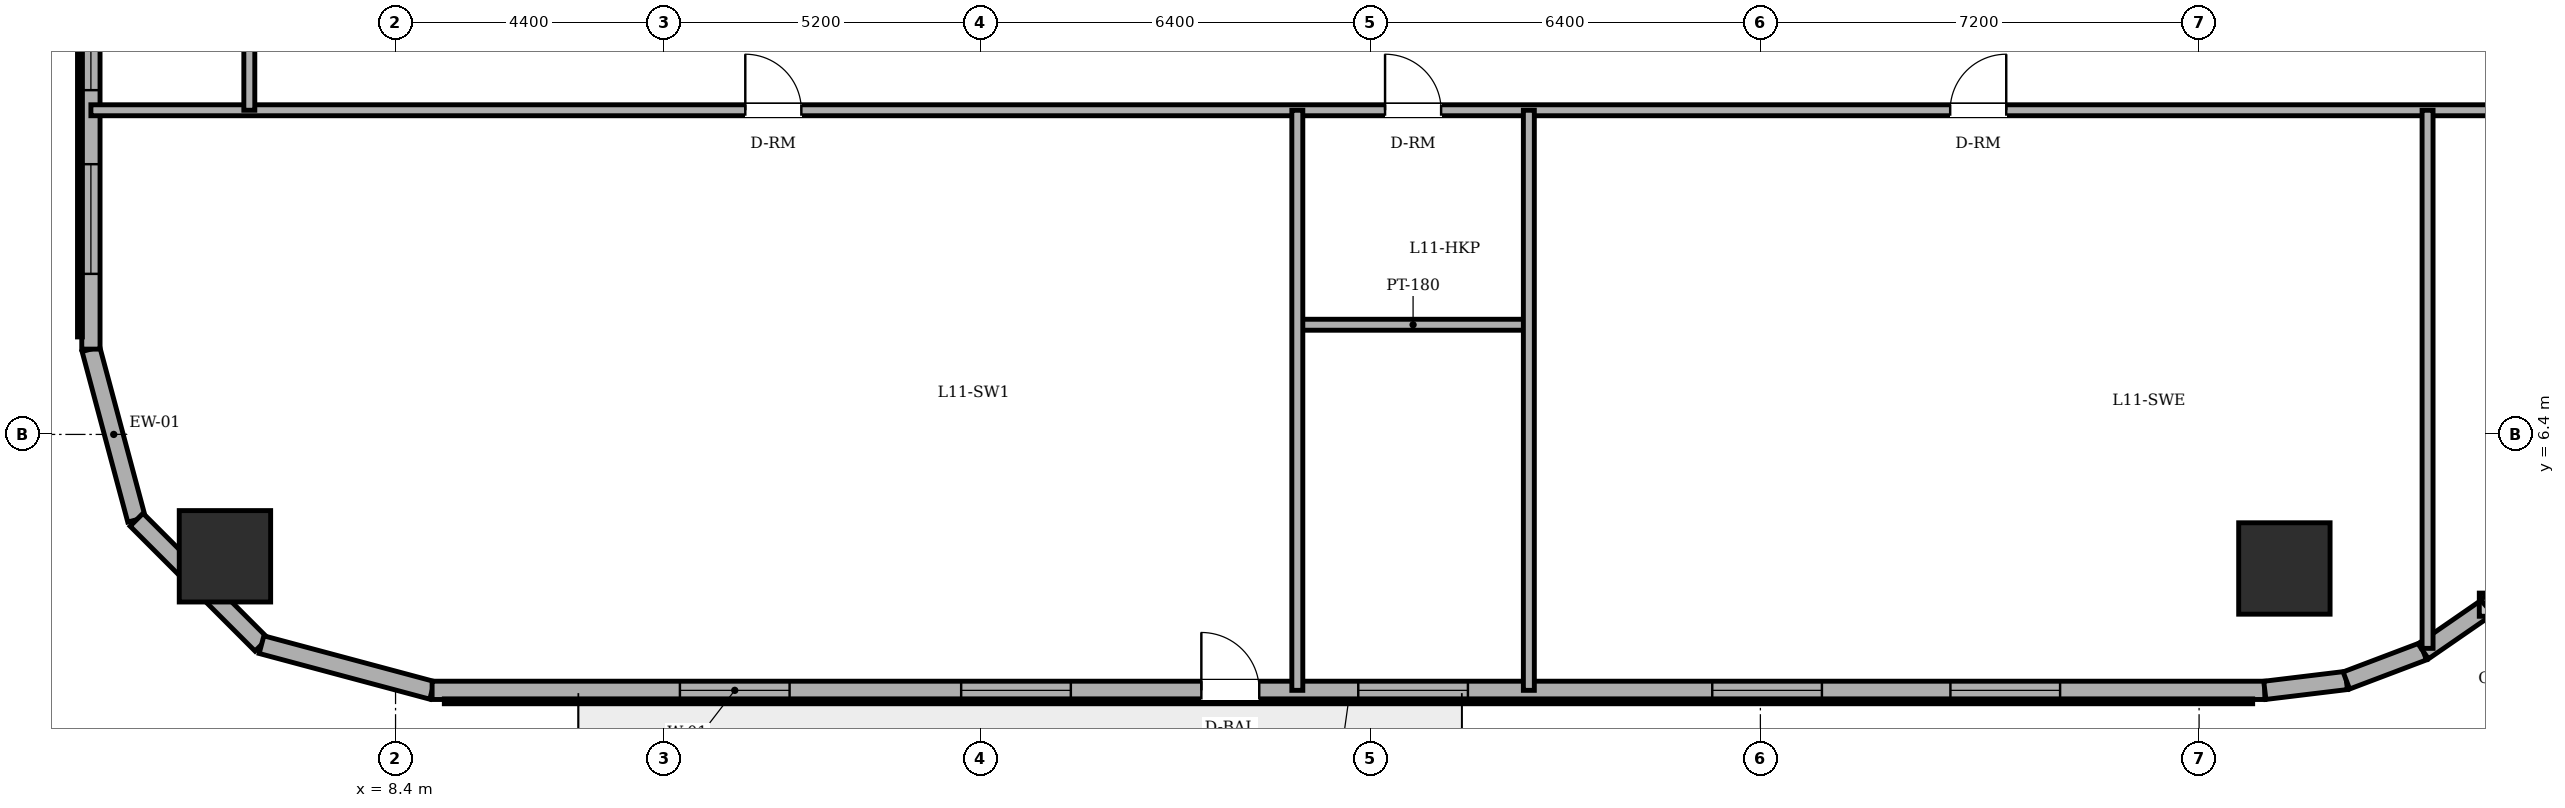
"""IFC4 building model, lengths in metres.
Left out: names, types, materials, properties, quantities, classifications, styles, units other than length and angle.
Written with IfcOpenShell. Run it as: python <this file> out.ifc"""

import sys

from ifc_helpers import new_model, si_unit, direction, frame, frame_2d, origin, origin_2d, place, context, subcontext, project, spatial, rectangle, circle, extrude, element, fill, save


model = new_model("IFC4")
c1 = context("Model", 3, precision=1e-05, world=origin(), true_north=direction((0.0, 1.0)))
c2 = subcontext(c1, "Body", "Model", "MODEL_VIEW")
j1 = project(units=[si_unit("LENGTHUNIT", "METRE"), si_unit("PLANEANGLEUNIT", "RADIAN")], contexts=[c1])
p1 = place(None, origin())
s1 = spatial("IfcSite", under=j1, at=p1, CompositionType="ELEMENT")
p2 = place(p1, origin())
s2 = spatial("IfcBuilding", under=s1, at=p2, CompositionType="ELEMENT")
p3 = place(p2, frame((0.0, 0.0, 43.2)))
s3 = spatial("IfcBuildingStorey", under=s2, at=p3, CompositionType="ELEMENT", Elevation=43.2)
for number, where, z_axis, x_axis in (
    (1, (5.6, 4.4, 0.0), (0.0, 0.0, 1.0), (1.0, 0.0, 0.0)),
    (2, (39.4, 4.2, 0.0), (0.0, 0.0, 1.0), (1.0, 0.0, 0.0)),
):
    element("IfcColumn", number, at=place(p3, frame(where, z_axis=z_axis, x_axis=x_axis)), inside=s3, PredefinedType="COLUMN", context=c2, shape_type="SweptSolid", body=[
        extrude(circle(Radius=0.75, at=origin_2d()), origin(), (0.0, 0.0, 1.0), 3.6),
    ])
p4 = place(p3, frame((3.4, 7.8, 0.0), z_axis=(0.0, 0.0, 1.0), x_axis=(0.258731875344, -0.96594917914, 0.0)))
e3 = element("IfcWall", 3, at=p4, inside=s3, PredefinedType="SOLIDWALL", context=c2, shape_type="SweptSolid", body=[
    extrude(rectangle(XDim=2.899, YDim=0.3, at=frame_2d((1.449, 0.0))), origin(), (0.0, 0.0, 1.0), 3.4),
])
p5 = place(p3, frame((4.15, 5.0, 0.0), z_axis=(0.0, 0.0, 1.0), x_axis=(0.707106781187, -0.707106781187, 0.0)))
e4 = element("IfcWall", 4, at=p5, inside=s3, PredefinedType="SOLIDWALL", context=c2, shape_type="SweptSolid", body=[
    extrude(rectangle(XDim=2.899, YDim=0.3, at=frame_2d((1.45, 0.0))), origin(), (0.0, 0.0, 1.0), 3.4),
])
p6 = place(p3, frame((6.2, 2.95, 0.0), z_axis=(0.0, 0.0, 1.0), x_axis=(0.96594917914, -0.258731875344, 0.0)))
e5 = element("IfcWall", 5, at=p6, inside=s3, PredefinedType="SOLIDWALL", context=c2, shape_type="SweptSolid", body=[
    extrude(rectangle(XDim=2.899, YDim=0.3, at=frame_2d((1.449, 0.0))), origin(), (0.0, 0.0, 1.0), 3.4),
])
p7 = place(p3, frame((9.0, 2.2, 0.0), z_axis=(0.0, 0.0, 1.0), x_axis=(1.0, 0.0, 0.0)))
e6 = element("IfcWall", 6, at=p7, inside=s3, PredefinedType="SOLIDWALL", context=c2, shape_type="SweptSolid", body=[
    extrude(rectangle(XDim=30.079, YDim=0.3, at=frame_2d((15.04, 0.0))), origin(), (0.0, 0.0, 1.0), 3.4),
])
p8 = place(p7, frame((12.625, 0.0, 0.0)))
e7 = element("IfcOpeningElement", 7, at=p8, cuts=e6, PredefinedType="OPENING", context=c2, shape_type="SweptSolid", body=[
    extrude(rectangle(XDim=0.95, YDim=2.2, at=frame_2d((0.475, 1.1))), frame((0.0, 0.16, 0.0), z_axis=(0.0, -1.0, 0.0), x_axis=(1.0, 0.0, 0.0)), (0.0, 0.0, 1.0), 0.32),
])
p9 = place(p7, frame((4.067, 0.0, 0.85)))
e8 = element("IfcOpeningElement", 8, at=p9, cuts=e6, PredefinedType="OPENING", context=c2, shape_type="SweptSolid", body=[
    extrude(rectangle(XDim=1.8, YDim=1.55, at=frame_2d((0.9, 0.775))), frame((0.0, 0.16, 0.0), z_axis=(0.0, -1.0, 0.0), x_axis=(1.0, 0.0, 0.0)), (0.0, 0.0, 1.0), 0.32),
])
p10 = place(p7, frame((8.683, 0.0, 0.85)))
e9 = element("IfcOpeningElement", 9, at=p10, cuts=e6, PredefinedType="OPENING", context=c2, shape_type="SweptSolid", body=[
    extrude(rectangle(XDim=1.8, YDim=1.55, at=frame_2d((0.9, 0.775))), frame((0.0, 0.16, 0.0), z_axis=(0.0, -1.0, 0.0), x_axis=(1.0, 0.0, 0.0)), (0.0, 0.0, 1.0), 0.32),
])
p11 = place(p7, frame((15.2, 0.0, 0.85)))
e10 = element("IfcOpeningElement", 10, at=p11, cuts=e6, PredefinedType="OPENING", context=c2, shape_type="SweptSolid", body=[
    extrude(rectangle(XDim=1.8, YDim=1.55, at=frame_2d((0.9, 0.775))), frame((0.0, 0.16, 0.0), z_axis=(0.0, -1.0, 0.0), x_axis=(1.0, 0.0, 0.0)), (0.0, 0.0, 1.0), 0.32),
])
p12 = place(p7, frame((21.01, 0.0, 0.85)))
e11 = element("IfcOpeningElement", 11, at=p12, cuts=e6, PredefinedType="OPENING", context=c2, shape_type="SweptSolid", body=[
    extrude(rectangle(XDim=1.8, YDim=1.55, at=frame_2d((0.9, 0.775))), frame((0.0, 0.16, 0.0), z_axis=(0.0, -1.0, 0.0), x_axis=(1.0, 0.0, 0.0)), (0.0, 0.0, 1.0), 0.32),
])
p13 = place(p7, frame((24.919, 0.0, 0.85)))
e12 = element("IfcOpeningElement", 12, at=p13, cuts=e6, PredefinedType="OPENING", context=c2, shape_type="SweptSolid", body=[
    extrude(rectangle(XDim=1.8, YDim=1.55, at=frame_2d((0.9, 0.775))), frame((0.0, 0.16, 0.0), z_axis=(0.0, -1.0, 0.0), x_axis=(1.0, 0.0, 0.0)), (0.0, 0.0, 1.0), 0.32),
])
p14 = place(p3, frame((39.079, 2.2, 0.0), z_axis=(0.0, 0.0, 1.0), x_axis=(0.992739027259, 0.120288086515, 0.0)))
e13 = element("IfcWall", 13, at=p14, inside=s3, PredefinedType="SOLIDWALL", context=c2, shape_type="SweptSolid", body=[
    extrude(rectangle(XDim=1.348, YDim=0.3, at=frame_2d((0.674, 0.0))), origin(), (0.0, 0.0, 1.0), 3.4),
])
p15 = place(p3, frame((40.417, 2.362, 0.0), z_axis=(0.0, 0.0, 1.0), x_axis=(0.935156721165, 0.354234254216, 0.0)))
e14 = element("IfcWall", 14, at=p15, inside=s3, PredefinedType="SOLIDWALL", context=c2, shape_type="SweptSolid", body=[
    extrude(rectangle(XDim=1.349, YDim=0.3, at=frame_2d((0.675, 0.0))), origin(), (0.0, 0.0, 1.0), 3.4),
])
p16 = place(p3, frame((41.679, 2.84, 0.0), z_axis=(0.0, 0.0, 1.0), x_axis=(0.823116500192, 0.567872544777, 0.0)))
e15 = element("IfcWall", 15, at=p16, inside=s3, PredefinedType="SOLIDWALL", context=c2, shape_type="SweptSolid", body=[
    extrude(rectangle(XDim=1.349, YDim=0.3, at=frame_2d((0.674, 0.0))), origin(), (0.0, 0.0, 1.0), 3.4),
])
p17 = place(p3, frame((3.4, 40.2, 0.0), z_axis=(0.0, 0.0, 1.0), x_axis=(0.0, -1.0, 0.0)))
e16 = element("IfcWall", 16, at=p17, inside=s3, PredefinedType="SOLIDWALL", context=c2, shape_type="SweptSolid", body=[
    extrude(rectangle(XDim=32.4, YDim=0.3, at=frame_2d((16.2, 0.0))), origin(), (0.0, 0.0, 1.0), 3.4),
])
p18 = place(p17, frame((1.235, 0.0, 0.85)))
e17 = element("IfcOpeningElement", 17, at=p18, cuts=e16, PredefinedType="OPENING", context=c2, shape_type="SweptSolid", body=[
    extrude(rectangle(XDim=1.8, YDim=1.55, at=frame_2d((0.9, 0.775))), frame((0.0, 0.16, 0.0), z_axis=(0.0, -1.0, 0.0), x_axis=(1.0, 0.0, 0.0)), (0.0, 0.0, 1.0), 0.32),
])
p19 = place(p17, frame((4.25, 0.0, 0.85)))
e18 = element("IfcOpeningElement", 18, at=p19, cuts=e16, PredefinedType="OPENING", context=c2, shape_type="SweptSolid", body=[
    extrude(rectangle(XDim=1.8, YDim=1.55, at=frame_2d((0.9, 0.775))), frame((0.0, 0.16, 0.0), z_axis=(0.0, -1.0, 0.0), x_axis=(1.0, 0.0, 0.0)), (0.0, 0.0, 1.0), 0.32),
])
p20 = place(p17, frame((9.253, 0.0, 0.85)))
e19 = element("IfcOpeningElement", 19, at=p20, cuts=e16, PredefinedType="OPENING", context=c2, shape_type="SweptSolid", body=[
    extrude(rectangle(XDim=1.8, YDim=1.55, at=frame_2d((0.9, 0.775))), frame((0.0, 0.16, 0.0), z_axis=(0.0, -1.0, 0.0), x_axis=(1.0, 0.0, 0.0)), (0.0, 0.0, 1.0), 0.32),
])
p21 = place(p17, frame((13.027, 0.0, 0.85)))
e20 = element("IfcOpeningElement", 20, at=p21, cuts=e16, PredefinedType="OPENING", context=c2, shape_type="SweptSolid", body=[
    extrude(rectangle(XDim=1.8, YDim=1.55, at=frame_2d((0.9, 0.775))), frame((0.0, 0.16, 0.0), z_axis=(0.0, -1.0, 0.0), x_axis=(1.0, 0.0, 0.0)), (0.0, 0.0, 1.0), 0.32),
])
p22 = place(p17, frame((19.573, 0.0, 0.85)))
e21 = element("IfcOpeningElement", 21, at=p22, cuts=e16, PredefinedType="OPENING", context=c2, shape_type="SweptSolid", body=[
    extrude(rectangle(XDim=1.8, YDim=1.55, at=frame_2d((0.9, 0.775))), frame((0.0, 0.16, 0.0), z_axis=(0.0, -1.0, 0.0), x_axis=(1.0, 0.0, 0.0)), (0.0, 0.0, 1.0), 0.32),
])
p23 = place(p17, frame((22.347, 0.0, 0.85)))
e22 = element("IfcOpeningElement", 22, at=p23, cuts=e16, PredefinedType="OPENING", context=c2, shape_type="SweptSolid", body=[
    extrude(rectangle(XDim=1.8, YDim=1.55, at=frame_2d((0.9, 0.775))), frame((0.0, 0.16, 0.0), z_axis=(0.0, -1.0, 0.0), x_axis=(1.0, 0.0, 0.0)), (0.0, 0.0, 1.0), 0.32),
])
p24 = place(p17, frame((26.35, 0.0, 0.85)))
e23 = element("IfcOpeningElement", 23, at=p24, cuts=e16, PredefinedType="OPENING", context=c2, shape_type="SweptSolid", body=[
    extrude(rectangle(XDim=1.8, YDim=1.55, at=frame_2d((0.9, 0.775))), frame((0.0, 0.16, 0.0), z_axis=(0.0, -1.0, 0.0), x_axis=(1.0, 0.0, 0.0)), (0.0, 0.0, 1.0), 0.32),
])
p25 = place(p17, frame((29.365, 0.0, 0.85)))
e24 = element("IfcOpeningElement", 24, at=p25, cuts=e16, PredefinedType="OPENING", context=c2, shape_type="SweptSolid", body=[
    extrude(rectangle(XDim=1.8, YDim=1.55, at=frame_2d((0.9, 0.775))), frame((0.0, 0.16, 0.0), z_axis=(0.0, -1.0, 0.0), x_axis=(1.0, 0.0, 0.0)), (0.0, 0.0, 1.0), 0.32),
])
p26 = place(p3, frame((23.2, 8.2, 0.0), z_axis=(0.0, 0.0, 1.0), x_axis=(1.0, 0.0, 0.0)))
e25 = element("IfcWall", 25, at=p26, inside=s3, PredefinedType="PARTITIONING", context=c2, shape_type="SweptSolid", body=[
    extrude(rectangle(XDim=3.8, YDim=0.18, at=frame_2d((1.9, 0.0))), origin(), (0.0, 0.0, 1.0), 3.4),
])
p27 = place(p3, frame((3.4, 11.72, 0.0), z_axis=(0.0, 0.0, 1.0), x_axis=(1.0, 0.0, 0.0)))
e26 = element("IfcWall", 26, at=p27, inside=s3, PredefinedType="PARTITIONING", context=c2, shape_type="SweptSolid", body=[
    extrude(rectangle(XDim=47.689, YDim=0.18, at=frame_2d((23.845, 0.0))), origin(), (0.0, 0.0, 1.0), 3.4),
])
p28 = place(p27, frame((21.24, 0.0, 0.0)))
e27 = element("IfcOpeningElement", 27, at=p28, cuts=e26, PredefinedType="OPENING", context=c2, shape_type="SweptSolid", body=[
    extrude(rectangle(XDim=0.92, YDim=2.1, at=frame_2d((0.46, 1.05))), frame((0.0, 0.1, 0.0), z_axis=(0.0, -1.0, 0.0), x_axis=(1.0, 0.0, 0.0)), (0.0, 0.0, 1.0), 0.2),
])
p29 = place(p27, frame((40.39, 0.0, 0.0)))
e28 = element("IfcOpeningElement", 28, at=p29, cuts=e26, PredefinedType="OPENING", context=c2, shape_type="SweptSolid", body=[
    extrude(rectangle(XDim=0.92, YDim=2.1, at=frame_2d((0.46, 1.05))), frame((0.0, 0.1, 0.0), z_axis=(0.0, -1.0, 0.0), x_axis=(1.0, 0.0, 0.0)), (0.0, 0.0, 1.0), 0.2),
])
p30 = place(p27, frame((10.74, 0.0, 0.0)))
e29 = element("IfcOpeningElement", 29, at=p30, cuts=e26, PredefinedType="OPENING", context=c2, shape_type="SweptSolid", body=[
    extrude(rectangle(XDim=0.92, YDim=2.1, at=frame_2d((0.46, 1.05))), frame((0.0, 0.1, 0.0), z_axis=(0.0, -1.0, 0.0), x_axis=(1.0, 0.0, 0.0)), (0.0, 0.0, 1.0), 0.2),
])
p31 = place(p27, frame((30.515, 0.0, 0.0)))
e30 = element("IfcOpeningElement", 30, at=p31, cuts=e26, PredefinedType="OPENING", context=c2, shape_type="SweptSolid", body=[
    extrude(rectangle(XDim=0.92, YDim=2.1, at=frame_2d((0.46, 1.05))), frame((0.0, 0.1, 0.0), z_axis=(0.0, -1.0, 0.0), x_axis=(1.0, 0.0, 0.0)), (0.0, 0.0, 1.0), 0.2),
])
p32 = place(p3, frame((6.0, 11.72, 0.0), z_axis=(0.0, 0.0, 1.0), x_axis=(0.0, 1.0, 0.0)))
e31 = element("IfcWall", 31, at=p32, inside=s3, PredefinedType="PARTITIONING", context=c2, shape_type="SweptSolid", body=[
    extrude(rectangle(XDim=2.46, YDim=0.18, at=frame_2d((1.23, 0.0))), origin(), (0.0, 0.0, 1.0), 3.4),
])
for number, where, z_axis, x_axis in (
    (32, (23.2, 2.2, 0.0), (0.0, 0.0, 1.0), (0.0, 1.0, 0.0)),
    (33, (27.0, 2.2, 0.0), (0.0, 0.0, 1.0), (0.0, 1.0, 0.0)),
):
    element("IfcWall", number, at=place(p3, frame(where, z_axis=z_axis, x_axis=x_axis)), inside=s3, PredefinedType="PARTITIONING", context=c2, shape_type="SweptSolid", body=[
        extrude(rectangle(XDim=9.52, YDim=0.18, at=frame_2d((4.76, 0.0))), origin(), (0.0, 0.0, 1.0), 3.4),
    ])
p33 = place(p3, frame((41.75, 2.889, 0.0), z_axis=(0.0, 0.0, 1.0), x_axis=(0.0, 1.0, 0.0)))
e34 = element("IfcWall", 34, at=p33, inside=s3, PredefinedType="PARTITIONING", context=c2, shape_type="SweptSolid", body=[
    extrude(rectangle(XDim=8.831, YDim=0.18, at=frame_2d((4.416, 0.0))), origin(), (0.0, 0.0, 1.0), 2.782),
])
p34 = place(p8, origin())
e35 = element("IfcDoor", 35, at=p34, inside=s3, OperationType="SINGLE_SWING_LEFT", PredefinedType="DOOR", context=c2, shape_type="SweptSolid", body=[
    extrude(rectangle(XDim=0.95, YDim=2.2, at=frame_2d((0.475, 1.1))), frame((0.0, 0.025, 0.0), z_axis=(0.0, -1.0, 0.0), x_axis=(1.0, 0.0, 0.0)), (0.0, 0.0, 1.0), 0.05),
])
fill(e7, e35)
p35 = place(p9, origin())
e36 = element("IfcWindow", 36, at=p35, inside=s3, PartitioningType="DOUBLE_PANEL_VERTICAL", PredefinedType="WINDOW", context=c2, shape_type="SweptSolid", body=[
    extrude(rectangle(XDim=1.8, YDim=1.55, at=frame_2d((0.9, 0.775))), frame((0.0, 0.03, 0.0), z_axis=(0.0, -1.0, 0.0), x_axis=(1.0, 0.0, 0.0)), (0.0, 0.0, 1.0), 0.06),
])
fill(e8, e36)
p36 = place(p10, origin())
e37 = element("IfcWindow", 37, at=p36, inside=s3, PartitioningType="DOUBLE_PANEL_VERTICAL", PredefinedType="WINDOW", context=c2, shape_type="SweptSolid", body=[
    extrude(rectangle(XDim=1.8, YDim=1.55, at=frame_2d((0.9, 0.775))), frame((0.0, 0.03, 0.0), z_axis=(0.0, -1.0, 0.0), x_axis=(1.0, 0.0, 0.0)), (0.0, 0.0, 1.0), 0.06),
])
fill(e9, e37)
p37 = place(p11, origin())
e38 = element("IfcWindow", 38, at=p37, inside=s3, PartitioningType="DOUBLE_PANEL_VERTICAL", PredefinedType="WINDOW", context=c2, shape_type="SweptSolid", body=[
    extrude(rectangle(XDim=1.8, YDim=1.55, at=frame_2d((0.9, 0.775))), frame((0.0, 0.03, 0.0), z_axis=(0.0, -1.0, 0.0), x_axis=(1.0, 0.0, 0.0)), (0.0, 0.0, 1.0), 0.06),
])
fill(e10, e38)
p38 = place(p12, origin())
e39 = element("IfcWindow", 39, at=p38, inside=s3, PartitioningType="DOUBLE_PANEL_VERTICAL", PredefinedType="WINDOW", context=c2, shape_type="SweptSolid", body=[
    extrude(rectangle(XDim=1.8, YDim=1.55, at=frame_2d((0.9, 0.775))), frame((0.0, 0.03, 0.0), z_axis=(0.0, -1.0, 0.0), x_axis=(1.0, 0.0, 0.0)), (0.0, 0.0, 1.0), 0.06),
])
fill(e11, e39)
p39 = place(p13, origin())
e40 = element("IfcWindow", 40, at=p39, inside=s3, PartitioningType="DOUBLE_PANEL_VERTICAL", PredefinedType="WINDOW", context=c2, shape_type="SweptSolid", body=[
    extrude(rectangle(XDim=1.8, YDim=1.55, at=frame_2d((0.9, 0.775))), frame((0.0, 0.03, 0.0), z_axis=(0.0, -1.0, 0.0), x_axis=(1.0, 0.0, 0.0)), (0.0, 0.0, 1.0), 0.06),
])
fill(e12, e40)
p40 = place(p24, origin())
e41 = element("IfcWindow", 41, at=p40, inside=s3, PartitioningType="DOUBLE_PANEL_VERTICAL", PredefinedType="WINDOW", context=c2, shape_type="SweptSolid", body=[
    extrude(rectangle(XDim=1.8, YDim=1.55, at=frame_2d((0.9, 0.775))), frame((0.0, 0.03, 0.0), z_axis=(0.0, -1.0, 0.0), x_axis=(1.0, 0.0, 0.0)), (0.0, 0.0, 1.0), 0.06),
])
fill(e23, e41)
p41 = place(p25, origin())
e42 = element("IfcWindow", 42, at=p41, inside=s3, PartitioningType="DOUBLE_PANEL_VERTICAL", PredefinedType="WINDOW", context=c2, shape_type="SweptSolid", body=[
    extrude(rectangle(XDim=1.8, YDim=1.55, at=frame_2d((0.9, 0.775))), frame((0.0, 0.03, 0.0), z_axis=(0.0, -1.0, 0.0), x_axis=(1.0, 0.0, 0.0)), (0.0, 0.0, 1.0), 0.06),
])
fill(e24, e42)
p42 = place(p28, origin())
e43 = element("IfcDoor", 43, at=p42, inside=s3, OperationType="SINGLE_SWING_LEFT", PredefinedType="DOOR", context=c2, shape_type="SweptSolid", body=[
    extrude(rectangle(XDim=0.92, YDim=2.1, at=frame_2d((0.46, 1.05))), frame((0.0, 0.025, 0.0), z_axis=(0.0, -1.0, 0.0), x_axis=(1.0, 0.0, 0.0)), (0.0, 0.0, 1.0), 0.05),
])
fill(e27, e43)
p43 = place(p30, origin())
e44 = element("IfcDoor", 44, at=p43, inside=s3, OperationType="SINGLE_SWING_LEFT", PredefinedType="DOOR", context=c2, shape_type="SweptSolid", body=[
    extrude(rectangle(XDim=0.92, YDim=2.1, at=frame_2d((0.46, 1.05))), frame((0.0, 0.025, 0.0), z_axis=(0.0, -1.0, 0.0), x_axis=(1.0, 0.0, 0.0)), (0.0, 0.0, 1.0), 0.05),
])
fill(e29, e44)
p44 = place(p31, origin())
e45 = element("IfcDoor", 45, at=p44, inside=s3, OperationType="SINGLE_SWING_RIGHT", PredefinedType="DOOR", context=c2, shape_type="SweptSolid", body=[
    extrude(rectangle(XDim=0.92, YDim=2.1, at=frame_2d((0.46, 1.05))), frame((0.0, 0.025, 0.0), z_axis=(0.0, -1.0, 0.0), x_axis=(1.0, 0.0, 0.0)), (0.0, 0.0, 1.0), 0.05),
])
fill(e30, e45)
save(model, sys.argv[1])
